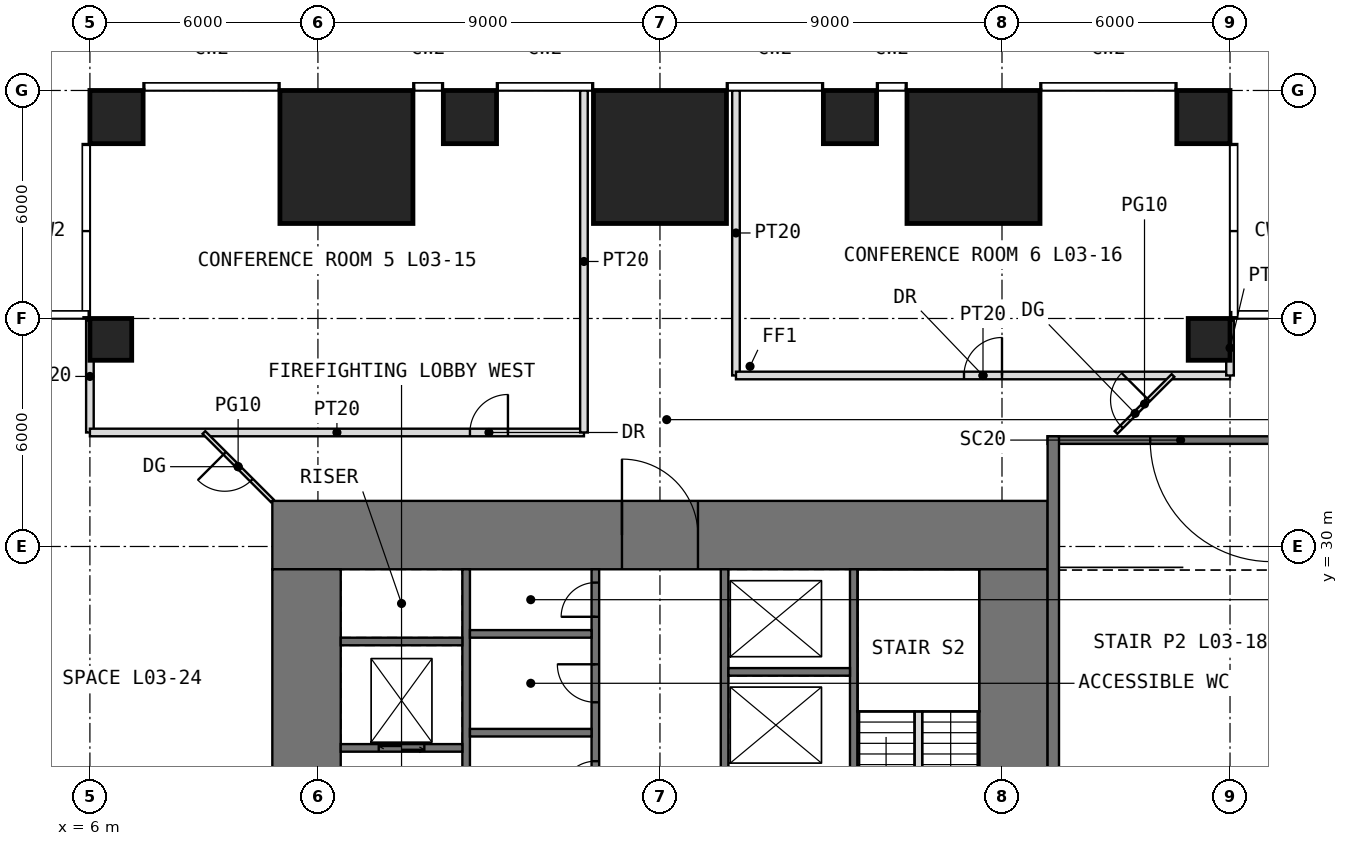
"""IFC4 building model, lengths in metres.
Left out: names, types, materials, properties, quantities, classifications, styles, units other than length and angle.
Written with IfcOpenShell. Run it as: python <this file> out.ifc"""

import sys

from ifc_helpers import new_model, si_unit, direction, frame, frame_2d, origin, origin_2d, place, context, subcontext, project, spatial, rectangle, extrude, element, fill, save


model = new_model("IFC4")
c1 = context("Model", 3, precision=1e-05, world=origin(), true_north=direction((0.0, 1.0)))
c2 = subcontext(c1, "Body", "Model", "MODEL_VIEW")
j1 = project(units=[si_unit("LENGTHUNIT", "METRE"), si_unit("PLANEANGLEUNIT", "RADIAN")], contexts=[c1])
p1 = place(None, origin())
s1 = spatial("IfcSite", under=j1, at=p1, CompositionType="ELEMENT")
p2 = place(p1, origin())
s2 = spatial("IfcBuilding", under=s1, at=p2, CompositionType="ELEMENT")
p3 = place(p2, frame((0.0, 0.0, 18.0)))
s3 = spatial("IfcBuildingStorey", under=s2, at=p3, CompositionType="ELEMENT", Elevation=18.0)
for number, where, z_axis, x_axis in (
    (1, (6.55, 35.45, 0.0), (0.0, 0.0, 1.0), (1.0, 0.0, 0.0)),
    (2, (35.45, 35.45, 0.0), (0.0, 0.0, 1.0), (1.0, 0.0, 0.0)),
):
    element("IfcColumn", number, at=place(p3, frame(where, z_axis=z_axis, x_axis=x_axis)), inside=s3, PredefinedType="COLUMN", context=c2, shape_type="SweptSolid", body=[
        extrude(rectangle(XDim=1.1, YDim=1.1, at=origin_2d()), origin(), (0.0, 0.0, 1.0), 4.5),
    ])
p4 = place(p3, frame((6.7, 41.3, 0.0), z_axis=(0.0, 0.0, 1.0), x_axis=(1.0, 0.0, 0.0)))
e3 = element("IfcColumn", 3, at=p4, inside=s3, PredefinedType="COLUMN", context=c2, shape_type="SweptSolid", body=[
    extrude(rectangle(XDim=1.4, YDim=1.4, at=origin_2d()), origin(), (0.0, 0.0, 1.0), 4.5),
])
p5 = place(p3, frame((12.75, 40.25, 0.0), z_axis=(0.0, 0.0, 1.0), x_axis=(1.0, 0.0, 0.0)))
e4 = element("IfcColumn", 4, at=p5, inside=s3, PredefinedType="COLUMN", context=c2, shape_type="SweptSolid", body=[
    extrude(rectangle(XDim=3.5, YDim=3.5, at=origin_2d()), origin(), (0.0, 0.0, 1.0), 4.5),
])
p6 = place(p3, frame((16.0, 41.3, 0.0), z_axis=(0.0, 0.0, 1.0), x_axis=(1.0, 0.0, 0.0)))
e5 = element("IfcColumn", 5, at=p6, inside=s3, PredefinedType="COLUMN", context=c2, shape_type="SweptSolid", body=[
    extrude(rectangle(XDim=1.4, YDim=1.4, at=origin_2d()), origin(), (0.0, 0.0, 1.0), 4.5),
])
p7 = place(p3, frame((21.0, 40.25, 0.0), z_axis=(0.0, 0.0, 1.0), x_axis=(1.0, 0.0, 0.0)))
e6 = element("IfcColumn", 6, at=p7, inside=s3, PredefinedType="COLUMN", context=c2, shape_type="SweptSolid", body=[
    extrude(rectangle(XDim=3.5, YDim=3.5, at=origin_2d()), origin(), (0.0, 0.0, 1.0), 4.5),
])
p8 = place(p3, frame((26.0, 41.3, 0.0), z_axis=(0.0, 0.0, 1.0), x_axis=(1.0, 0.0, 0.0)))
e7 = element("IfcColumn", 7, at=p8, inside=s3, PredefinedType="COLUMN", context=c2, shape_type="SweptSolid", body=[
    extrude(rectangle(XDim=1.4, YDim=1.4, at=origin_2d()), origin(), (0.0, 0.0, 1.0), 4.5),
])
p9 = place(p3, frame((29.25, 40.25, 0.0), z_axis=(0.0, 0.0, 1.0), x_axis=(1.0, 0.0, 0.0)))
e8 = element("IfcColumn", 8, at=p9, inside=s3, PredefinedType="COLUMN", context=c2, shape_type="SweptSolid", body=[
    extrude(rectangle(XDim=3.5, YDim=3.5, at=origin_2d()), origin(), (0.0, 0.0, 1.0), 4.5),
])
p10 = place(p3, frame((35.3, 41.3, 0.0), z_axis=(0.0, 0.0, 1.0), x_axis=(1.0, 0.0, 0.0)))
e9 = element("IfcColumn", 9, at=p10, inside=s3, PredefinedType="COLUMN", context=c2, shape_type="SweptSolid", body=[
    extrude(rectangle(XDim=1.4, YDim=1.4, at=origin_2d()), origin(), (0.0, 0.0, 1.0), 4.5),
])
p11 = place(p3, frame((10.8, 30.3, -0.2), z_axis=(0.0, 0.0, 1.0), x_axis=(1.0, 0.0, 0.0)))
e10 = element("IfcWall", 10, at=p11, inside=s3, PredefinedType="SHEAR", context=c2, shape_type="SweptSolid", body=[
    extrude(rectangle(XDim=20.4, YDim=1.8, at=frame_2d((10.2, 0.0))), origin(), (0.0, 0.0, 1.0), 4.65),
])
p12 = place(p11, frame((9.2, 0.0, 0.2)))
e11 = element("IfcOpeningElement", 11, at=p12, cuts=e10, PredefinedType="OPENING", context=c2, shape_type="SweptSolid", body=[
    extrude(rectangle(XDim=2.0, YDim=2.2, at=frame_2d((1.0, 1.1))), frame((0.0, 0.91, 0.0), z_axis=(0.0, -1.0, 0.0), x_axis=(1.0, 0.0, 0.0)), (0.0, 0.0, 1.0), 1.82),
])
p13 = place(p3, frame((11.7, 12.6, -0.2), z_axis=(0.0, 0.0, 1.0), x_axis=(0.0, 1.0, 0.0)))
e12 = element("IfcWall", 12, at=p13, inside=s3, PredefinedType="SHEAR", context=c2, shape_type="SweptSolid", body=[
    extrude(rectangle(XDim=16.8, YDim=1.8, at=frame_2d((8.4, 0.0))), origin(), (0.0, 0.0, 1.0), 4.65),
])
p14 = place(p13, frame((9.9, 0.0, 0.2)))
e13 = element("IfcOpeningElement", 13, at=p14, cuts=e12, PredefinedType="OPENING", context=c2, shape_type="SweptSolid", body=[
    extrude(rectangle(XDim=1.0, YDim=2.2, at=frame_2d((0.5, 1.1))), frame((0.0, 0.91, 0.0), z_axis=(0.0, -1.0, 0.0), x_axis=(1.0, 0.0, 0.0)), (0.0, 0.0, 1.0), 1.82),
])
p15 = place(p3, frame((30.3, 12.6, -0.2), z_axis=(0.0, 0.0, 1.0), x_axis=(0.0, 1.0, 0.0)))
e14 = element("IfcWall", 14, at=p15, inside=s3, PredefinedType="SHEAR", context=c2, shape_type="SweptSolid", body=[
    extrude(rectangle(XDim=16.8, YDim=1.8, at=frame_2d((8.4, 0.0))), origin(), (0.0, 0.0, 1.0), 4.65),
])
p16 = place(p15, frame((5.9, 0.0, 0.2)))
e15 = element("IfcOpeningElement", 15, at=p16, cuts=e14, PredefinedType="OPENING", context=c2, shape_type="SweptSolid", body=[
    extrude(rectangle(XDim=1.0, YDim=2.2, at=frame_2d((0.5, 1.1))), frame((0.0, 0.91, 0.0), z_axis=(0.0, -1.0, 0.0), x_axis=(1.0, 0.0, 0.0)), (0.0, 0.0, 1.0), 1.82),
])
p17 = place(p3, frame((15.9, 12.6, -0.2), z_axis=(0.0, 0.0, 1.0), x_axis=(0.0, 1.0, 0.0)))
e16 = element("IfcWall", 16, at=p17, inside=s3, PredefinedType="SHEAR", context=c2, shape_type="SweptSolid", body=[
    extrude(rectangle(XDim=16.8, YDim=0.2, at=frame_2d((8.4, 0.0))), origin(), (0.0, 0.0, 1.0), 4.65),
])
p18 = place(p17, frame((8.9, 0.0, 0.2)))
e17 = element("IfcOpeningElement", 17, at=p18, cuts=e16, PredefinedType="OPENING", context=c2, shape_type="SweptSolid", body=[
    extrude(rectangle(XDim=1.0, YDim=2.2, at=frame_2d((0.5, 1.1))), frame((0.0, 0.11, 0.0), z_axis=(0.0, -1.0, 0.0), x_axis=(1.0, 0.0, 0.0)), (0.0, 0.0, 1.0), 0.22),
])
p19 = place(p3, frame((19.3, 12.6, -0.2), z_axis=(0.0, 0.0, 1.0), x_axis=(0.0, 1.0, 0.0)))
e18 = element("IfcWall", 18, at=p19, inside=s3, PredefinedType="SHEAR", context=c2, shape_type="SweptSolid", body=[
    extrude(rectangle(XDim=16.8, YDim=0.2, at=frame_2d((8.4, 0.0))), origin(), (0.0, 0.0, 1.0), 4.65),
])
p20 = place(p19, frame((8.7, 0.0, 0.2)))
e19 = element("IfcOpeningElement", 19, at=p20, cuts=e18, PredefinedType="OPENING", context=c2, shape_type="SweptSolid", body=[
    extrude(rectangle(XDim=1.0, YDim=2.2, at=frame_2d((0.5, 1.1))), frame((0.0, 0.11, 0.0), z_axis=(0.0, -1.0, 0.0), x_axis=(1.0, 0.0, 0.0)), (0.0, 0.0, 1.0), 0.22),
])
p21 = place(p19, frame((10.85, 0.0, 0.2)))
e20 = element("IfcOpeningElement", 20, at=p21, cuts=e18, PredefinedType="OPENING", context=c2, shape_type="SweptSolid", body=[
    extrude(rectangle(XDim=0.9, YDim=2.2, at=frame_2d((0.45, 1.1))), frame((0.0, 0.11, 0.0), z_axis=(0.0, -1.0, 0.0), x_axis=(1.0, 0.0, 0.0)), (0.0, 0.0, 1.0), 0.22),
])
p22 = place(p19, frame((13.3, 0.0, 0.2)))
e21 = element("IfcOpeningElement", 21, at=p22, cuts=e18, PredefinedType="OPENING", context=c2, shape_type="SweptSolid", body=[
    extrude(rectangle(XDim=1.0, YDim=2.2, at=frame_2d((0.5, 1.1))), frame((0.0, 0.11, 0.0), z_axis=(0.0, -1.0, 0.0), x_axis=(1.0, 0.0, 0.0)), (0.0, 0.0, 1.0), 0.22),
])
p23 = place(p19, frame((15.55, 0.0, 0.2)))
e22 = element("IfcOpeningElement", 22, at=p23, cuts=e18, PredefinedType="OPENING", context=c2, shape_type="SweptSolid", body=[
    extrude(rectangle(XDim=0.9, YDim=2.2, at=frame_2d((0.45, 1.1))), frame((0.0, 0.11, 0.0), z_axis=(0.0, -1.0, 0.0), x_axis=(1.0, 0.0, 0.0)), (0.0, 0.0, 1.0), 0.22),
])
p24 = place(p19, frame((0.75, 0.0, 0.2)))
e23 = element("IfcOpeningElement", 23, at=p24, cuts=e18, PredefinedType="OPENING", context=c2, shape_type="SweptSolid", body=[
    extrude(rectangle(XDim=1.1, YDim=2.2, at=frame_2d((0.55, 1.1))), frame((0.0, 0.11, 0.0), z_axis=(0.0, -1.0, 0.0), x_axis=(1.0, 0.0, 0.0)), (0.0, 0.0, 1.0), 0.22),
])
p25 = place(p19, frame((3.55, 0.0, 0.2)))
e24 = element("IfcOpeningElement", 24, at=p25, cuts=e18, PredefinedType="OPENING", context=c2, shape_type="SweptSolid", body=[
    extrude(rectangle(XDim=1.1, YDim=2.2, at=frame_2d((0.55, 1.1))), frame((0.0, 0.11, 0.0), z_axis=(0.0, -1.0, 0.0), x_axis=(1.0, 0.0, 0.0)), (0.0, 0.0, 1.0), 0.22),
])
p26 = place(p19, frame((6.35, 0.0, 0.2)))
e25 = element("IfcOpeningElement", 25, at=p26, cuts=e18, PredefinedType="OPENING", context=c2, shape_type="SweptSolid", body=[
    extrude(rectangle(XDim=1.1, YDim=2.2, at=frame_2d((0.55, 1.1))), frame((0.0, 0.11, 0.0), z_axis=(0.0, -1.0, 0.0), x_axis=(1.0, 0.0, 0.0)), (0.0, 0.0, 1.0), 0.22),
])
p27 = place(p3, frame((22.7, 12.6, -0.2), z_axis=(0.0, 0.0, 1.0), x_axis=(0.0, 1.0, 0.0)))
e26 = element("IfcWall", 26, at=p27, inside=s3, PredefinedType="SHEAR", context=c2, shape_type="SweptSolid", body=[
    extrude(rectangle(XDim=16.8, YDim=0.2, at=frame_2d((8.4, 0.0))), origin(), (0.0, 0.0, 1.0), 4.65),
])
p28 = place(p27, frame((7.1, 0.0, 0.2)))
e27 = element("IfcOpeningElement", 27, at=p28, cuts=e26, PredefinedType="OPENING", context=c2, shape_type="SweptSolid", body=[
    extrude(rectangle(XDim=1.0, YDim=2.2, at=frame_2d((0.5, 1.1))), frame((0.0, 0.11, 0.0), z_axis=(0.0, -1.0, 0.0), x_axis=(1.0, 0.0, 0.0)), (0.0, 0.0, 1.0), 0.22),
])
p29 = place(p27, frame((1.55, 0.0, 0.2)))
e28 = element("IfcOpeningElement", 28, at=p29, cuts=e26, PredefinedType="OPENING", context=c2, shape_type="SweptSolid", body=[
    extrude(rectangle(XDim=0.9, YDim=2.2, at=frame_2d((0.45, 1.1))), frame((0.0, 0.11, 0.0), z_axis=(0.0, -1.0, 0.0), x_axis=(1.0, 0.0, 0.0)), (0.0, 0.0, 1.0), 0.22),
])
p30 = place(p27, frame((4.95, 0.0, 0.2)))
e29 = element("IfcOpeningElement", 29, at=p30, cuts=e26, PredefinedType="OPENING", context=c2, shape_type="SweptSolid", body=[
    extrude(rectangle(XDim=0.9, YDim=2.2, at=frame_2d((0.45, 1.1))), frame((0.0, 0.11, 0.0), z_axis=(0.0, -1.0, 0.0), x_axis=(1.0, 0.0, 0.0)), (0.0, 0.0, 1.0), 0.22),
])
p31 = place(p3, frame((26.1, 12.6, -0.2), z_axis=(0.0, 0.0, 1.0), x_axis=(0.0, 1.0, 0.0)))
e30 = element("IfcWall", 30, at=p31, inside=s3, PredefinedType="SHEAR", context=c2, shape_type="SweptSolid", body=[
    extrude(rectangle(XDim=16.8, YDim=0.2, at=frame_2d((8.4, 0.0))), origin(), (0.0, 0.0, 1.0), 4.65),
])
p32 = place(p31, frame((6.9, 0.0, 0.2)))
e31 = element("IfcOpeningElement", 31, at=p32, cuts=e30, PredefinedType="OPENING", context=c2, shape_type="SweptSolid", body=[
    extrude(rectangle(XDim=1.0, YDim=2.2, at=frame_2d((0.5, 1.1))), frame((0.0, 0.11, 0.0), z_axis=(0.0, -1.0, 0.0), x_axis=(1.0, 0.0, 0.0)), (0.0, 0.0, 1.0), 0.22),
])
p33 = place(p3, frame((12.6, 24.7, -0.2), z_axis=(0.0, 0.0, 1.0), x_axis=(1.0, 0.0, 0.0)))
e32 = element("IfcWall", 32, at=p33, inside=s3, PredefinedType="SHEAR", context=c2, shape_type="SweptSolid", body=[
    extrude(rectangle(XDim=3.2, YDim=0.2, at=frame_2d((1.6, 0.0))), origin(), (0.0, 0.0, 1.0), 4.65),
])
p34 = place(p33, frame((1.0, 0.0, 0.2)))
e33 = element("IfcOpeningElement", 33, at=p34, cuts=e32, PredefinedType="OPENING", context=c2, shape_type="SweptSolid", body=[
    extrude(rectangle(XDim=1.2, YDim=2.2, at=frame_2d((0.6, 1.1))), frame((0.0, 0.11, 0.0), z_axis=(0.0, -1.0, 0.0), x_axis=(1.0, 0.0, 0.0)), (0.0, 0.0, 1.0), 0.22),
])
for number, where, z_axis, x_axis in (
    (34, (12.6, 27.5, -0.2), (0.0, 0.0, 1.0), (1.0, 0.0, 0.0)),
    (35, (16.0, 25.1, -0.2), (0.0, 0.0, 1.0), (1.0, 0.0, 0.0)),
    (36, (16.0, 27.7, -0.2), (0.0, 0.0, 1.0), (1.0, 0.0, 0.0)),
    (37, (22.8, 26.7, -0.2), (0.0, 0.0, 1.0), (1.0, 0.0, 0.0)),
):
    element("IfcWall", number, at=place(p3, frame(where, z_axis=z_axis, x_axis=x_axis)), inside=s3, PredefinedType="SHEAR", context=c2, shape_type="SweptSolid", body=[
        extrude(rectangle(XDim=3.2, YDim=0.2, at=frame_2d((1.6, 0.0))), origin(), (0.0, 0.0, 1.0), 4.65),
    ])
p35 = place(p3, frame((38.2, 32.8, -0.2), z_axis=(0.0, 0.0, 1.0), x_axis=(-1.0, 0.0, 0.0)))
e38 = element("IfcWall", 38, at=p35, inside=s3, PredefinedType="SOLIDWALL", context=c2, shape_type="SweptSolid", body=[
    extrude(rectangle(XDim=7.0, YDim=0.2, at=frame_2d((3.5, 0.0))), origin(), (0.0, 0.0, 1.0), 4.65),
])
p36 = place(p35, frame((1.1, 0.0, 0.2)))
e39 = element("IfcOpeningElement", 39, at=p36, cuts=e38, PredefinedType="OPENING", context=c2, shape_type="SweptSolid", body=[
    extrude(rectangle(XDim=3.2, YDim=2.4, at=frame_2d((1.6, 1.2))), frame((0.0, 0.11, 0.0), z_axis=(0.0, -1.0, 0.0), x_axis=(1.0, 0.0, 0.0)), (0.0, 0.0, 1.0), 0.22),
])
p37 = place(p3, frame((31.35, 32.9, -0.2), z_axis=(0.0, 0.0, 1.0), x_axis=(0.0, -1.0, 0.0)))
e40 = element("IfcWall", 40, at=p37, inside=s3, PredefinedType="SOLIDWALL", context=c2, shape_type="SweptSolid", body=[
    extrude(rectangle(XDim=13.1, YDim=0.3, at=frame_2d((6.55, 0.0))), origin(), (0.0, 0.0, 1.0), 4.65),
])
p38 = place(p3, frame((6.0, 33.0, 0.0), z_axis=(0.0, 0.0, 1.0), x_axis=(0.0, 1.0, 0.0)))
e41 = element("IfcWall", 41, at=p38, inside=s3, PredefinedType="PARTITIONING", context=c2, shape_type="SweptSolid", body=[
    extrude(rectangle(XDim=2.95, YDim=0.2, at=frame_2d((1.475, 0.0))), origin(), (0.0, 0.0, 1.0), 3.63),
])
p39 = place(p3, frame((6.0, 33.0, 0.0), z_axis=(0.0, 0.0, 1.0), x_axis=(1.0, 0.0, 0.0)))
e42 = element("IfcWall", 42, at=p39, inside=s3, PredefinedType="PARTITIONING", context=c2, shape_type="SweptSolid", body=[
    extrude(rectangle(XDim=13.0, YDim=0.2, at=frame_2d((6.5, 0.0))), origin(), (0.0, 0.0, 1.0), 4.25),
])
p40 = place(p39, frame((10.0, 0.0, 0.0)))
e43 = element("IfcOpeningElement", 43, at=p40, cuts=e42, PredefinedType="OPENING", context=c2, shape_type="SweptSolid", body=[
    extrude(rectangle(XDim=1.0, YDim=2.2, at=frame_2d((0.5, 1.1))), frame((0.0, 0.11, 0.0), z_axis=(0.0, -1.0, 0.0), x_axis=(1.0, 0.0, 0.0)), (0.0, 0.0, 1.0), 0.22),
])
p41 = place(p3, frame((19.0, 33.0, 0.0), z_axis=(0.0, 0.0, 1.0), x_axis=(0.0, 1.0, 0.0)))
e44 = element("IfcWall", 44, at=p41, inside=s3, PredefinedType="PARTITIONING", context=c2, shape_type="SweptSolid", body=[
    extrude(rectangle(XDim=9.0, YDim=0.2, at=frame_2d((4.5, 0.0))), origin(), (0.0, 0.0, 1.0), 4.25),
])
p42 = place(p3, frame((23.0, 34.5, 0.0), z_axis=(0.0, 0.0, 1.0), x_axis=(0.0, 1.0, 0.0)))
e45 = element("IfcWall", 45, at=p42, inside=s3, PredefinedType="PARTITIONING", context=c2, shape_type="SweptSolid", body=[
    extrude(rectangle(XDim=7.5, YDim=0.2, at=frame_2d((3.75, 0.0))), origin(), (0.0, 0.0, 1.0), 4.25),
])
p43 = place(p3, frame((23.0, 34.5, 0.0), z_axis=(0.0, 0.0, 1.0), x_axis=(1.0, 0.0, 0.0)))
e46 = element("IfcWall", 46, at=p43, inside=s3, PredefinedType="PARTITIONING", context=c2, shape_type="SweptSolid", body=[
    extrude(rectangle(XDim=13.0, YDim=0.2, at=frame_2d((6.5, 0.0))), origin(), (0.0, 0.0, 1.0), 4.25),
])
p44 = place(p43, frame((6.0, 0.0, 0.0)))
e47 = element("IfcOpeningElement", 47, at=p44, cuts=e46, PredefinedType="OPENING", context=c2, shape_type="SweptSolid", body=[
    extrude(rectangle(XDim=1.0, YDim=2.2, at=frame_2d((0.5, 1.1))), frame((0.0, 0.11, 0.0), z_axis=(0.0, -1.0, 0.0), x_axis=(1.0, 0.0, 0.0)), (0.0, 0.0, 1.0), 0.22),
])
p45 = place(p3, frame((36.0, 34.5, 0.0), z_axis=(0.0, 0.0, 1.0), x_axis=(0.0, 1.0, 0.0)))
e48 = element("IfcWall", 48, at=p45, inside=s3, PredefinedType="PARTITIONING", context=c2, shape_type="SweptSolid", body=[
    extrude(rectangle(XDim=1.45, YDim=0.2, at=frame_2d((0.725, 0.0))), origin(), (0.0, 0.0, 1.0), 3.63),
])
p46 = place(p3, frame((33.0, 33.0, 0.0), z_axis=(0.0, 0.0, 1.0), x_axis=(0.707106781187, 0.707106781187, 0.0)))
e49 = element("IfcWall", 49, at=p46, inside=s3, PredefinedType="PARTITIONING", context=c2, shape_type="SweptSolid", body=[
    extrude(rectangle(XDim=2.121, YDim=0.1, at=frame_2d((1.061, 0.0))), origin(), (0.0, 0.0, 1.0), 4.25),
])
p47 = place(p46, frame((0.211, 0.0, 0.0)))
e50 = element("IfcOpeningElement", 50, at=p47, cuts=e49, PredefinedType="OPENING", context=c2, shape_type="SweptSolid", body=[
    extrude(rectangle(XDim=1.0, YDim=2.4, at=frame_2d((0.5, 1.2))), frame((0.0, 0.06, 0.0), z_axis=(0.0, -1.0, 0.0), x_axis=(1.0, 0.0, 0.0)), (0.0, 0.0, 1.0), 0.12),
])
p48 = place(p3, frame((10.8, 31.2, 0.0), z_axis=(0.0, 0.0, 1.0), x_axis=(-0.707106781187, 0.707106781187, 0.0)))
e51 = element("IfcWall", 51, at=p48, inside=s3, PredefinedType="PARTITIONING", context=c2, shape_type="SweptSolid", body=[
    extrude(rectangle(XDim=2.546, YDim=0.1, at=frame_2d((1.273, 0.0))), origin(), (0.0, 0.0, 1.0), 4.25),
])
p49 = place(p48, frame((0.773, 0.0, 0.0)))
e52 = element("IfcOpeningElement", 52, at=p49, cuts=e51, PredefinedType="OPENING", context=c2, shape_type="SweptSolid", body=[
    extrude(rectangle(XDim=1.0, YDim=2.4, at=frame_2d((0.5, 1.2))), frame((0.0, 0.06, 0.0), z_axis=(0.0, -1.0, 0.0), x_axis=(1.0, 0.0, 0.0)), (0.0, 0.0, 1.0), 0.12),
])
p50 = place(p3, frame((27.8, 22.3, 0.0), z_axis=(0.0, 0.0, 1.0), x_axis=(0.0, 1.0, 0.0)))
e53 = element("IfcWall", 53, at=p50, inside=s3, PredefinedType="PARTITIONING", context=c2, shape_type="SweptSolid", body=[
    extrude(rectangle(XDim=3.36, YDim=0.2, at=frame_2d((1.68, 0.0))), origin(), (0.0, 0.0, 1.0), 4.5),
])
p51 = place(p12, origin())
e54 = element("IfcDoor", 54, at=p51, inside=s3, OperationType="DOUBLE_DOOR_SINGLE_SWING", PredefinedType="DOOR", context=c2, shape_type="SweptSolid", body=[
    extrude(rectangle(XDim=2.0, YDim=2.2, at=frame_2d((1.0, 1.1))), frame((0.0, 0.025, 0.0), z_axis=(0.0, -1.0, 0.0), x_axis=(1.0, 0.0, 0.0)), (0.0, 0.0, 1.0), 0.05),
])
fill(e11, e54)
p52 = place(p21, origin())
e55 = element("IfcDoor", 55, at=p52, inside=s3, OperationType="SINGLE_SWING_LEFT", PredefinedType="DOOR", context=c2, shape_type="SweptSolid", body=[
    extrude(rectangle(XDim=0.9, YDim=2.2, at=frame_2d((0.45, 1.1))), frame((0.0, 0.025, 0.0), z_axis=(0.0, -1.0, 0.0), x_axis=(1.0, 0.0, 0.0)), (0.0, 0.0, 1.0), 0.05),
])
fill(e20, e55)
p53 = place(p22, origin())
e56 = element("IfcDoor", 56, at=p53, inside=s3, OperationType="SINGLE_SWING_RIGHT", PredefinedType="DOOR", context=c2, shape_type="SweptSolid", body=[
    extrude(rectangle(XDim=1.0, YDim=2.2, at=frame_2d((0.5, 1.1))), frame((0.0, 0.025, 0.0), z_axis=(0.0, -1.0, 0.0), x_axis=(1.0, 0.0, 0.0)), (0.0, 0.0, 1.0), 0.05),
])
fill(e21, e56)
p54 = place(p23, origin())
e57 = element("IfcDoor", 57, at=p54, inside=s3, OperationType="SINGLE_SWING_LEFT", PredefinedType="DOOR", context=c2, shape_type="SweptSolid", body=[
    extrude(rectangle(XDim=0.9, YDim=2.2, at=frame_2d((0.45, 1.1))), frame((0.0, 0.025, 0.0), z_axis=(0.0, -1.0, 0.0), x_axis=(1.0, 0.0, 0.0)), (0.0, 0.0, 1.0), 0.05),
])
fill(e22, e57)
p55 = place(p36, origin())
e58 = element("IfcDoor", 58, at=p55, inside=s3, OperationType="DOUBLE_DOOR_SINGLE_SWING", PredefinedType="DOOR", context=c2, shape_type="SweptSolid", body=[
    extrude(rectangle(XDim=3.2, YDim=2.4, at=frame_2d((1.6, 1.2))), frame((0.0, 0.025, 0.0), z_axis=(0.0, -1.0, 0.0), x_axis=(1.0, 0.0, 0.0)), (0.0, 0.0, 1.0), 0.05),
])
fill(e39, e58)
p56 = place(p40, origin())
e59 = element("IfcDoor", 59, at=p56, inside=s3, OperationType="SINGLE_SWING_RIGHT", PredefinedType="DOOR", context=c2, shape_type="SweptSolid", body=[
    extrude(rectangle(XDim=1.0, YDim=2.2, at=frame_2d((0.5, 1.1))), frame((0.0, 0.025, 0.0), z_axis=(0.0, -1.0, 0.0), x_axis=(1.0, 0.0, 0.0)), (0.0, 0.0, 1.0), 0.05),
])
fill(e43, e59)
p57 = place(p44, origin())
e60 = element("IfcDoor", 60, at=p57, inside=s3, OperationType="SINGLE_SWING_RIGHT", PredefinedType="DOOR", context=c2, shape_type="SweptSolid", body=[
    extrude(rectangle(XDim=1.0, YDim=2.2, at=frame_2d((0.5, 1.1))), frame((0.0, 0.025, 0.0), z_axis=(0.0, -1.0, 0.0), x_axis=(1.0, 0.0, 0.0)), (0.0, 0.0, 1.0), 0.05),
])
fill(e47, e60)
p58 = place(p47, origin())
e61 = element("IfcDoor", 61, at=p58, inside=s3, OperationType="SINGLE_SWING_RIGHT", PredefinedType="DOOR", context=c2, shape_type="SweptSolid", body=[
    extrude(rectangle(XDim=1.0, YDim=2.4, at=frame_2d((0.5, 1.2))), frame((0.0, 0.025, 0.0), z_axis=(0.0, -1.0, 0.0), x_axis=(1.0, 0.0, 0.0)), (0.0, 0.0, 1.0), 0.05),
])
fill(e50, e61)
p59 = place(p49, origin())
e62 = element("IfcDoor", 62, at=p59, inside=s3, OperationType="SINGLE_SWING_RIGHT", PredefinedType="DOOR", context=c2, shape_type="SweptSolid", body=[
    extrude(rectangle(XDim=1.0, YDim=2.4, at=frame_2d((0.5, 1.2))), frame((0.0, 0.025, 0.0), z_axis=(0.0, -1.0, 0.0), x_axis=(1.0, 0.0, 0.0)), (0.0, 0.0, 1.0), 0.05),
])
fill(e52, e62)
p60 = place(p34, origin())
e63 = element("IfcDoor", 63, at=p60, inside=s3, OperationType="DOUBLE_DOOR_SLIDING", PredefinedType="DOOR", context=c2, shape_type="SweptSolid", body=[
    extrude(rectangle(XDim=1.2, YDim=2.2, at=frame_2d((0.6, 1.1))), frame((0.0, 0.025, 0.0), z_axis=(0.0, -1.0, 0.0), x_axis=(1.0, 0.0, 0.0)), (0.0, 0.0, 1.0), 0.05),
])
fill(e33, e63)
save(model, sys.argv[1])
